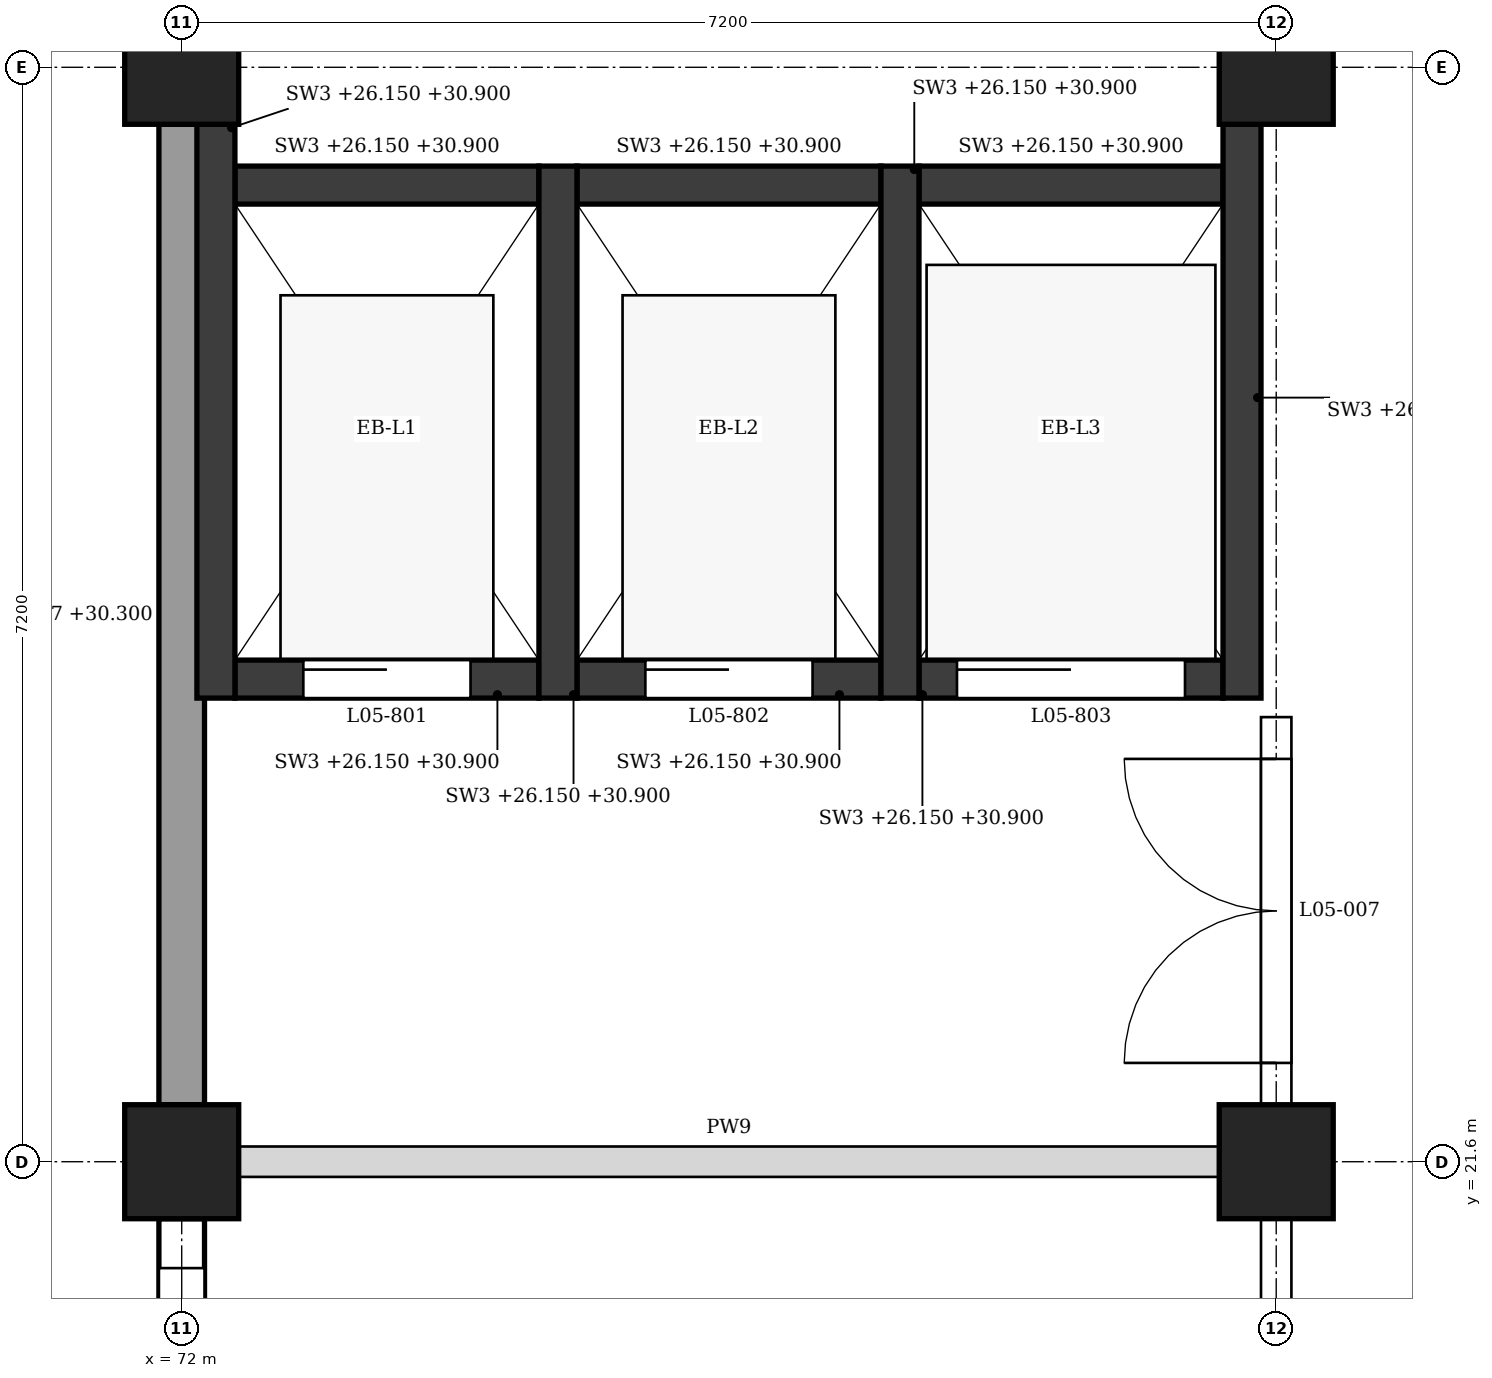
"""IFC4 building model, lengths in metres.
Left out: names, types, materials, properties, quantities, classifications, styles, units other than length and angle.
Written with IfcOpenShell. Run it as: python <this file> out.ifc"""

import sys

from ifc_helpers import new_model, si_unit, direction, frame, frame_2d, origin, origin_2d, place, context, subcontext, project, spatial, polyline, rectangle, outline, extrude, element, fill, save


model = new_model("IFC4")
c1 = context("Model", 3, precision=1e-05, world=origin(), true_north=direction((0.0, 1.0)))
c2 = subcontext(c1, "Body", "Model", "MODEL_VIEW")
j1 = project(units=[si_unit("LENGTHUNIT", "METRE"), si_unit("PLANEANGLEUNIT", "RADIAN")], contexts=[c1])
p1 = place(None, origin())
s1 = spatial("IfcSite", under=j1, at=p1, CompositionType="ELEMENT")
p2 = place(p1, origin())
s2 = spatial("IfcBuilding", under=s1, at=p2, CompositionType="ELEMENT")
p3 = place(p2, frame((0.0, 0.0, 26.4)))
s3 = spatial("IfcBuildingStorey", under=s2, at=p3, CompositionType="ELEMENT", Elevation=26.4)
for number, where, z_axis, x_axis in (
    (1, (72.0, 21.6, 0.0), (0.0, 0.0, 1.0), (1.0, 0.0, 0.0)),
    (2, (72.0, 28.8, 0.0), (0.0, 0.0, 1.0), (1.0, 0.0, 0.0)),
    (3, (79.2, 21.6, 0.0), (0.0, 0.0, 1.0), (1.0, 0.0, 0.0)),
    (4, (79.2, 28.8, 0.0), (0.0, 0.0, 1.0), (1.0, 0.0, 0.0)),
):
    element("IfcColumn", number, at=place(p3, frame(where, z_axis=z_axis, x_axis=x_axis)), inside=s3, PredefinedType="COLUMN", context=c2, shape_type="SweptSolid", body=[
        extrude(rectangle(XDim=0.75, YDim=0.75, at=origin_2d()), origin(), (0.0, 0.0, 1.0), 4.8),
    ])
p4 = place(p3, frame((72.0, 14.775, 0.0), z_axis=(0.0, 0.0, 1.0), x_axis=(0.0, 1.0, 0.0)))
e5 = element("IfcWall", 5, at=p4, inside=s3, PredefinedType="STANDARD", context=c2, shape_type="SweptSolid", body=[
    extrude(rectangle(XDim=6.45, YDim=0.3, at=frame_2d((3.225, 0.0))), origin(), (0.0, 0.0, 1.0), 3.9),
])
p5 = place(p4, frame((0.325, 0.0, 1.5)))
e6 = element("IfcOpeningElement", 6, at=p5, cuts=e5, PredefinedType="OPENING", context=c2, shape_type="SweptSolid", body=[
    extrude(outline(polyline([(0.0, 0.0), (5.8, 0.0), (5.8, 0.4), (2.9, 1.9), (0.0, 0.4), (0.0, 0.0)])), frame((0.0, 0.16, 0.0), z_axis=(0.0, -1.0, 0.0), x_axis=(1.0, 0.0, 0.0)), (0.0, 0.0, 1.0), 0.32),
])
p6 = place(p3, frame((72.0, 21.975, 0.0), z_axis=(0.0, 0.0, 1.0), x_axis=(0.0, 1.0, 0.0)))
e7 = element("IfcWall", 7, at=p6, inside=s3, PredefinedType="STANDARD", context=c2, shape_type="SweptSolid", body=[
    extrude(rectangle(XDim=6.45, YDim=0.3, at=frame_2d((3.225, 0.0))), origin(), (0.0, 0.0, 1.0), 3.9),
])
p7 = place(p3, frame((72.225, 24.65, -0.25), z_axis=(0.0, 0.0, 1.0), x_axis=(0.0, 1.0, 0.0)))
e8 = element("IfcWall", 8, at=p7, inside=s3, PredefinedType="SHEAR", context=c2, shape_type="SweptSolid", body=[
    extrude(rectangle(XDim=3.775, YDim=0.25, at=frame_2d((1.888, 0.0))), origin(), (0.0, 0.0, 1.0), 4.75),
])
for number, where, z_axis, x_axis in (
    (9, (74.475, 24.65, -0.25), (0.0, 0.0, 1.0), (0.0, 1.0, 0.0)),
    (10, (76.725, 24.65, -0.25), (0.0, 0.0, 1.0), (0.0, 1.0, 0.0)),
):
    element("IfcWall", number, at=place(p3, frame(where, z_axis=z_axis, x_axis=x_axis)), inside=s3, PredefinedType="SHEAR", context=c2, shape_type="SweptSolid", body=[
        extrude(rectangle(XDim=3.5, YDim=0.25, at=frame_2d((1.75, 0.0))), origin(), (0.0, 0.0, 1.0), 4.75),
    ])
p8 = place(p3, frame((78.975, 24.65, -0.25), z_axis=(0.0, 0.0, 1.0), x_axis=(0.0, 1.0, 0.0)))
e11 = element("IfcWall", 11, at=p8, inside=s3, PredefinedType="SHEAR", context=c2, shape_type="SweptSolid", body=[
    extrude(rectangle(XDim=3.775, YDim=0.25, at=frame_2d((1.888, 0.0))), origin(), (0.0, 0.0, 1.0), 4.75),
])
p9 = place(p3, frame((72.35, 24.775, -0.25), z_axis=(0.0, 0.0, 1.0), x_axis=(1.0, 0.0, 0.0)))
e12 = element("IfcWall", 12, at=p9, inside=s3, PredefinedType="SHEAR", context=c2, shape_type="SweptSolid", body=[
    extrude(rectangle(XDim=2.0, YDim=0.25, at=frame_2d((1.0, 0.0))), origin(), (0.0, 0.0, 1.0), 4.75),
])
p10 = place(p9, frame((0.45, 0.0, 0.25)))
e13 = element("IfcOpeningElement", 13, at=p10, cuts=e12, PredefinedType="OPENING", context=c2, shape_type="SweptSolid", body=[
    extrude(rectangle(XDim=1.1, YDim=2.1, at=frame_2d((0.55, 1.05))), frame((0.0, 0.135, 0.0), z_axis=(0.0, -1.0, 0.0), x_axis=(1.0, 0.0, 0.0)), (0.0, 0.0, 1.0), 0.27),
])
p11 = place(p3, frame((72.35, 28.025, -0.25), z_axis=(0.0, 0.0, 1.0), x_axis=(1.0, 0.0, 0.0)))
e14 = element("IfcWall", 14, at=p11, inside=s3, PredefinedType="SHEAR", context=c2, shape_type="SweptSolid", body=[
    extrude(rectangle(XDim=2.0, YDim=0.25, at=frame_2d((1.0, 0.0))), origin(), (0.0, 0.0, 1.0), 4.75),
])
p12 = place(p3, frame((74.6, 24.775, -0.25), z_axis=(0.0, 0.0, 1.0), x_axis=(1.0, 0.0, 0.0)))
e15 = element("IfcWall", 15, at=p12, inside=s3, PredefinedType="SHEAR", context=c2, shape_type="SweptSolid", body=[
    extrude(rectangle(XDim=2.0, YDim=0.25, at=frame_2d((1.0, 0.0))), origin(), (0.0, 0.0, 1.0), 4.75),
])
p13 = place(p12, frame((0.45, 0.0, 0.25)))
e16 = element("IfcOpeningElement", 16, at=p13, cuts=e15, PredefinedType="OPENING", context=c2, shape_type="SweptSolid", body=[
    extrude(rectangle(XDim=1.1, YDim=2.1, at=frame_2d((0.55, 1.05))), frame((0.0, 0.135, 0.0), z_axis=(0.0, -1.0, 0.0), x_axis=(1.0, 0.0, 0.0)), (0.0, 0.0, 1.0), 0.27),
])
p14 = place(p3, frame((74.6, 28.025, -0.25), z_axis=(0.0, 0.0, 1.0), x_axis=(1.0, 0.0, 0.0)))
e17 = element("IfcWall", 17, at=p14, inside=s3, PredefinedType="SHEAR", context=c2, shape_type="SweptSolid", body=[
    extrude(rectangle(XDim=2.0, YDim=0.25, at=frame_2d((1.0, 0.0))), origin(), (0.0, 0.0, 1.0), 4.75),
])
p15 = place(p3, frame((76.85, 24.775, -0.25), z_axis=(0.0, 0.0, 1.0), x_axis=(1.0, 0.0, 0.0)))
e18 = element("IfcWall", 18, at=p15, inside=s3, PredefinedType="SHEAR", context=c2, shape_type="SweptSolid", body=[
    extrude(rectangle(XDim=2.0, YDim=0.25, at=frame_2d((1.0, 0.0))), origin(), (0.0, 0.0, 1.0), 4.75),
])
p16 = place(p15, frame((0.25, 0.0, 0.25)))
e19 = element("IfcOpeningElement", 19, at=p16, cuts=e18, PredefinedType="OPENING", context=c2, shape_type="SweptSolid", body=[
    extrude(rectangle(XDim=1.5, YDim=2.1, at=frame_2d((0.75, 1.05))), frame((0.0, 0.135, 0.0), z_axis=(0.0, -1.0, 0.0), x_axis=(1.0, 0.0, 0.0)), (0.0, 0.0, 1.0), 0.27),
])
p17 = place(p3, frame((76.85, 28.025, -0.25), z_axis=(0.0, 0.0, 1.0), x_axis=(1.0, 0.0, 0.0)))
e20 = element("IfcWall", 20, at=p17, inside=s3, PredefinedType="SHEAR", context=c2, shape_type="SweptSolid", body=[
    extrude(rectangle(XDim=2.0, YDim=0.25, at=frame_2d((1.0, 0.0))), origin(), (0.0, 0.0, 1.0), 4.75),
])
p18 = place(p3, frame((72.375, 21.6, 0.0), z_axis=(0.0, 0.0, 1.0), x_axis=(1.0, 0.0, 0.0)))
e21 = element("IfcWall", 21, at=p18, inside=s3, PredefinedType="PARTITIONING", context=c2, shape_type="SweptSolid", body=[
    extrude(rectangle(XDim=6.45, YDim=0.2, at=frame_2d((3.225, 0.0))), origin(), (0.0, 0.0, 1.0), 3.85),
])
p19 = place(p3, frame((79.2, 14.775, 0.0), z_axis=(0.0, 0.0, 1.0), x_axis=(0.0, 1.0, 0.0)))
e22 = element("IfcWall", 22, at=p19, inside=s3, PredefinedType="PARTITIONING", context=c2, shape_type="SweptSolid", body=[
    extrude(rectangle(XDim=6.45, YDim=0.2, at=frame_2d((3.225, 0.0))), origin(), (0.0, 0.0, 1.0), 3.85),
])
p20 = place(p19, frame((2.725, 0.0, 0.0)))
e23 = element("IfcOpeningElement", 23, at=p20, cuts=e22, PredefinedType="OPENING", context=c2, shape_type="SweptSolid", body=[
    extrude(rectangle(XDim=1.0, YDim=2.1, at=frame_2d((0.5, 1.05))), frame((0.0, 0.11, 0.0), z_axis=(0.0, -1.0, 0.0), x_axis=(1.0, 0.0, 0.0)), (0.0, 0.0, 1.0), 0.22),
])
p21 = place(p3, frame((79.2, 21.975, 0.0), z_axis=(0.0, 0.0, 1.0), x_axis=(0.0, 1.0, 0.0)))
e24 = element("IfcWall", 24, at=p21, inside=s3, PredefinedType="PARTITIONING", context=c2, shape_type="SweptSolid", body=[
    extrude(rectangle(XDim=2.55, YDim=0.2, at=frame_2d((1.275, 0.0))), origin(), (0.0, 0.0, 1.0), 3.85),
])
p22 = place(p21, frame((0.275, 0.0, 0.0)))
e25 = element("IfcOpeningElement", 25, at=p22, cuts=e24, PredefinedType="OPENING", context=c2, shape_type="SweptSolid", body=[
    extrude(rectangle(XDim=2.0, YDim=2.4, at=frame_2d((1.0, 1.2))), frame((0.0, 0.11, 0.0), z_axis=(0.0, -1.0, 0.0), x_axis=(1.0, 0.0, 0.0)), (0.0, 0.0, 1.0), 0.22),
])
p23 = place(p5, origin())
e26 = element("IfcWindow", 26, at=p23, inside=s3, PartitioningType="TRIPLE_PANEL_VERTICAL", PredefinedType="WINDOW", context=c2, shape_type="SweptSolid", body=[
    extrude(outline(polyline([(0.0, 0.0), (5.8, 0.0), (5.8, 0.4), (2.9, 1.9), (0.0, 0.4), (0.0, 0.0)])), frame((0.0, 0.03, 0.0), z_axis=(0.0, -1.0, 0.0), x_axis=(1.0, 0.0, 0.0)), (0.0, 0.0, 1.0), 0.06),
])
fill(e6, e26)
p24 = place(p10, origin())
e27 = element("IfcDoor", 27, at=p24, inside=s3, OperationType="SLIDING_TO_LEFT", PredefinedType="DOOR", context=c2, shape_type="SweptSolid", body=[
    extrude(rectangle(XDim=1.1, YDim=2.1, at=frame_2d((0.55, 1.05))), frame((0.0, 0.025, 0.0), z_axis=(0.0, -1.0, 0.0), x_axis=(1.0, 0.0, 0.0)), (0.0, 0.0, 1.0), 0.05),
])
fill(e13, e27)
p25 = place(p13, origin())
e28 = element("IfcDoor", 28, at=p25, inside=s3, OperationType="SLIDING_TO_LEFT", PredefinedType="DOOR", context=c2, shape_type="SweptSolid", body=[
    extrude(rectangle(XDim=1.1, YDim=2.1, at=frame_2d((0.55, 1.05))), frame((0.0, 0.025, 0.0), z_axis=(0.0, -1.0, 0.0), x_axis=(1.0, 0.0, 0.0)), (0.0, 0.0, 1.0), 0.05),
])
fill(e16, e28)
p26 = place(p16, origin())
e29 = element("IfcDoor", 29, at=p26, inside=s3, OperationType="SLIDING_TO_LEFT", PredefinedType="DOOR", context=c2, shape_type="SweptSolid", body=[
    extrude(rectangle(XDim=1.5, YDim=2.1, at=frame_2d((0.75, 1.05))), frame((0.0, 0.025, 0.0), z_axis=(0.0, -1.0, 0.0), x_axis=(1.0, 0.0, 0.0)), (0.0, 0.0, 1.0), 0.05),
])
fill(e19, e29)
p27 = place(p22, origin())
e30 = element("IfcDoor", 30, at=p27, inside=s3, OperationType="DOUBLE_DOOR_SINGLE_SWING", PredefinedType="DOOR", context=c2, shape_type="SweptSolid", body=[
    extrude(rectangle(XDim=2.0, YDim=2.4, at=frame_2d((1.0, 1.2))), frame((0.0, 0.025, 0.0), z_axis=(0.0, -1.0, 0.0), x_axis=(1.0, 0.0, 0.0)), (0.0, 0.0, 1.0), 0.05),
])
fill(e25, e30)
save(model, sys.argv[1])
